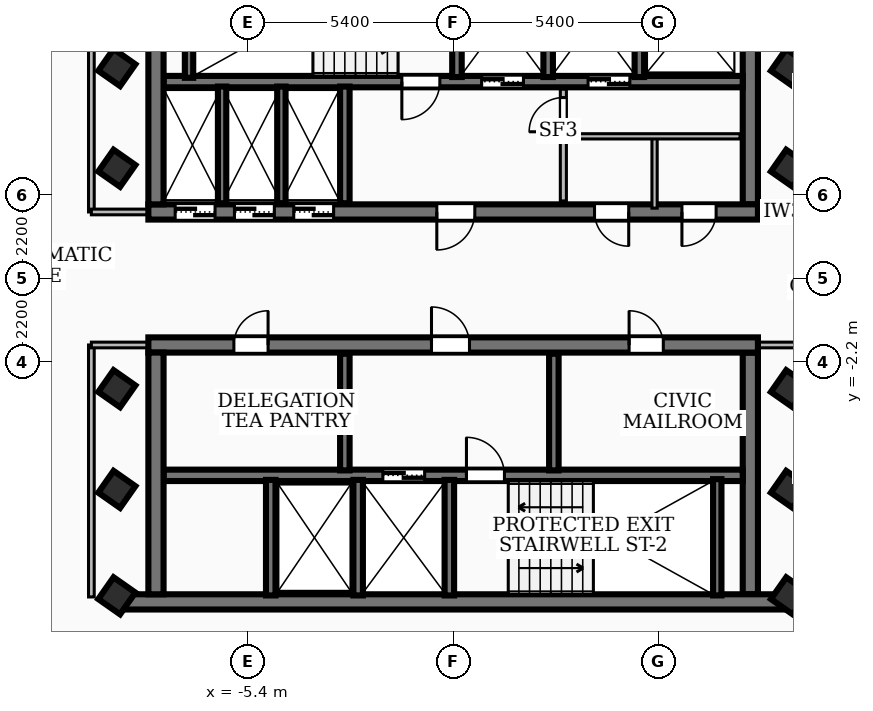
"""IFC4 building model, lengths in metres.
Left out: names, types, materials, properties, quantities, classifications, styles, units other than length and angle.
Written with IfcOpenShell. Run it as: python <this file> out.ifc"""

import sys

from ifc_helpers import new_model, si_unit, direction, frame, frame_2d, origin, origin_2d, place, context, subcontext, project, spatial, rectangle, extrude, element, fill, save


model = new_model("IFC4")
c1 = context("Model", 3, precision=1e-05, world=origin(), true_north=direction((0.0, 1.0)))
c2 = subcontext(c1, "Body", "Model", "MODEL_VIEW")
j1 = project(units=[si_unit("LENGTHUNIT", "METRE"), si_unit("PLANEANGLEUNIT", "RADIAN")], contexts=[c1])
p1 = place(None, origin())
s1 = spatial("IfcSite", under=j1, at=p1, CompositionType="ELEMENT")
p2 = place(p1, origin())
s2 = spatial("IfcBuilding", under=s1, at=p2, CompositionType="ELEMENT")
p3 = place(p2, frame((0.0, 0.0, 264.6)))
s3 = spatial("IfcBuildingStorey", under=s2, at=p3, CompositionType="ELEMENT", Elevation=264.6)
p4 = place(p3, frame((8.02, 1.75, 0.0), z_axis=(0.0, 0.0, 1.0), x_axis=(-1.0, 0.0, 0.0)))
e1 = element("IfcWall", 1, at=p4, inside=s3, PredefinedType="SHEAR", context=c2, shape_type="SweptSolid", body=[
    extrude(rectangle(XDim=16.04, YDim=0.4, at=frame_2d((8.02, 0.0))), origin(), (0.0, 0.0, 1.0), 3.16),
])
p5 = place(p4, frame((7.45, 0.0, 0.0)))
e2 = element("IfcOpeningElement", 2, at=p5, cuts=e1, PredefinedType="OPENING", context=c2, shape_type="SweptSolid", body=[
    extrude(rectangle(XDim=1.0, YDim=2.1, at=frame_2d((0.5, 1.05))), frame((0.0, 0.21, 0.0), z_axis=(0.0, -1.0, 0.0), x_axis=(1.0, 0.0, 0.0)), (0.0, 0.0, 1.0), 0.42),
])
p6 = place(p4, frame((14.285, 0.0, 0.0)))
e3 = element("IfcOpeningElement", 3, at=p6, cuts=e1, PredefinedType="OPENING", context=c2, shape_type="SweptSolid", body=[
    extrude(rectangle(XDim=1.05, YDim=2.15, at=frame_2d((0.525, 1.075))), frame((0.0, 0.21, 0.0), z_axis=(0.0, -1.0, 0.0), x_axis=(1.0, 0.0, 0.0)), (0.0, 0.0, 1.0), 0.42),
])
p7 = place(p4, frame((12.725, 0.0, 0.0)))
e4 = element("IfcOpeningElement", 4, at=p7, cuts=e1, PredefinedType="OPENING", context=c2, shape_type="SweptSolid", body=[
    extrude(rectangle(XDim=1.05, YDim=2.15, at=frame_2d((0.525, 1.075))), frame((0.0, 0.21, 0.0), z_axis=(0.0, -1.0, 0.0), x_axis=(1.0, 0.0, 0.0)), (0.0, 0.0, 1.0), 0.42),
])
p8 = place(p4, frame((11.165, 0.0, 0.0)))
e5 = element("IfcOpeningElement", 5, at=p8, cuts=e1, PredefinedType="OPENING", context=c2, shape_type="SweptSolid", body=[
    extrude(rectangle(XDim=1.05, YDim=2.15, at=frame_2d((0.525, 1.075))), frame((0.0, 0.21, 0.0), z_axis=(0.0, -1.0, 0.0), x_axis=(1.0, 0.0, 0.0)), (0.0, 0.0, 1.0), 0.42),
])
p9 = place(p4, frame((3.4, 0.0, 0.0)))
e6 = element("IfcOpeningElement", 6, at=p9, cuts=e1, PredefinedType="OPENING", context=c2, shape_type="SweptSolid", body=[
    extrude(rectangle(XDim=0.9, YDim=2.06, at=frame_2d((0.45, 1.03))), frame((0.0, 0.21, 0.0), z_axis=(0.0, -1.0, 0.0), x_axis=(1.0, 0.0, 0.0)), (0.0, 0.0, 1.0), 0.42),
])
p10 = place(p4, frame((1.1, 0.0, 0.0)))
e7 = element("IfcOpeningElement", 7, at=p10, cuts=e1, PredefinedType="OPENING", context=c2, shape_type="SweptSolid", body=[
    extrude(rectangle(XDim=0.9, YDim=2.06, at=frame_2d((0.45, 1.03))), frame((0.0, 0.21, 0.0), z_axis=(0.0, -1.0, 0.0), x_axis=(1.0, 0.0, 0.0)), (0.0, 0.0, 1.0), 0.42),
])
for number, where, z_axis, x_axis in (
    (8, (-7.82, 1.95, 0.0), (0.0, 0.0, 1.0), (0.0, 1.0, 0.0)),
    (9, (7.82, 8.31, 0.0), (0.0, 0.0, 1.0), (0.0, -1.0, 0.0)),
):
    element("IfcWall", number, at=place(p3, frame(where, z_axis=z_axis, x_axis=x_axis)), inside=s3, PredefinedType="SHEAR", context=c2, shape_type="SweptSolid", body=[
        extrude(rectangle(XDim=6.36, YDim=0.4, at=frame_2d((3.18, 0.0))), origin(), (0.0, 0.0, 1.0), 3.16),
    ])
p11 = place(p3, frame((7.62, 5.18, 0.0), z_axis=(0.0, 0.0, 1.0), x_axis=(-1.0, 0.0, 0.0)))
e10 = element("IfcWall", 10, at=p11, inside=s3, PredefinedType="SOLIDWALL", context=c2, shape_type="SweptSolid", body=[
    extrude(rectangle(XDim=15.24, YDim=0.3, at=frame_2d((7.62, 0.0))), origin(), (0.0, 0.0, 1.0), 3.16),
])
p12 = place(p11, frame((5.77, 0.0, 0.0)))
e11 = element("IfcOpeningElement", 11, at=p12, cuts=e10, PredefinedType="OPENING", context=c2, shape_type="SweptSolid", body=[
    extrude(rectangle(XDim=1.1, YDim=2.15, at=frame_2d((0.55, 1.075))), frame((0.0, 0.16, 0.0), z_axis=(0.0, -1.0, 0.0), x_axis=(1.0, 0.0, 0.0)), (0.0, 0.0, 1.0), 0.32),
])
p13 = place(p11, frame((2.97, 0.0, 0.0)))
e12 = element("IfcOpeningElement", 12, at=p13, cuts=e10, PredefinedType="OPENING", context=c2, shape_type="SweptSolid", body=[
    extrude(rectangle(XDim=1.1, YDim=2.15, at=frame_2d((0.55, 1.075))), frame((0.0, 0.16, 0.0), z_axis=(0.0, -1.0, 0.0), x_axis=(1.0, 0.0, 0.0)), (0.0, 0.0, 1.0), 0.32),
])
p14 = place(p11, frame((7.97, 0.0, 0.0)))
e13 = element("IfcOpeningElement", 13, at=p14, cuts=e10, PredefinedType="OPENING", context=c2, shape_type="SweptSolid", body=[
    extrude(rectangle(XDim=1.0, YDim=2.1, at=frame_2d((0.5, 1.05))), frame((0.0, 0.16, 0.0), z_axis=(0.0, -1.0, 0.0), x_axis=(1.0, 0.0, 0.0)), (0.0, 0.0, 1.0), 0.32),
])
p15 = place(p3, frame((8.78, -8.51, 0.0), z_axis=(0.0, 0.0, 1.0), x_axis=(-1.0, 0.0, 0.0)))
e14 = element("IfcWall", 14, at=p15, inside=s3, PredefinedType="SHEAR", context=c2, shape_type="SweptSolid", body=[
    extrude(rectangle(XDim=17.56, YDim=0.4, at=frame_2d((8.78, 0.0))), origin(), (0.0, 0.0, 1.0), 3.16),
])
p16 = place(p3, frame((-8.02, -1.75, 0.0), z_axis=(0.0, 0.0, 1.0), x_axis=(1.0, 0.0, 0.0)))
e15 = element("IfcWall", 15, at=p16, inside=s3, PredefinedType="SHEAR", context=c2, shape_type="SweptSolid", body=[
    extrude(rectangle(XDim=16.04, YDim=0.4, at=frame_2d((8.02, 0.0))), origin(), (0.0, 0.0, 1.0), 3.16),
])
p17 = place(p16, frame((7.45, 0.0, 0.0)))
e16 = element("IfcOpeningElement", 16, at=p17, cuts=e15, PredefinedType="OPENING", context=c2, shape_type="SweptSolid", body=[
    extrude(rectangle(XDim=1.0, YDim=2.1, at=frame_2d((0.5, 1.05))), frame((0.0, 0.21, 0.0), z_axis=(0.0, -1.0, 0.0), x_axis=(1.0, 0.0, 0.0)), (0.0, 0.0, 1.0), 0.42),
])
p18 = place(p16, frame((12.65, 0.0, 0.0)))
e17 = element("IfcOpeningElement", 17, at=p18, cuts=e15, PredefinedType="OPENING", context=c2, shape_type="SweptSolid", body=[
    extrude(rectangle(XDim=0.9, YDim=2.06, at=frame_2d((0.45, 1.03))), frame((0.0, 0.21, 0.0), z_axis=(0.0, -1.0, 0.0), x_axis=(1.0, 0.0, 0.0)), (0.0, 0.0, 1.0), 0.42),
])
p19 = place(p16, frame((2.25, 0.0, 0.0)))
e18 = element("IfcOpeningElement", 18, at=p19, cuts=e15, PredefinedType="OPENING", context=c2, shape_type="SweptSolid", body=[
    extrude(rectangle(XDim=0.9, YDim=2.06, at=frame_2d((0.45, 1.03))), frame((0.0, 0.21, 0.0), z_axis=(0.0, -1.0, 0.0), x_axis=(1.0, 0.0, 0.0)), (0.0, 0.0, 1.0), 0.42),
])
for number, where, z_axis, x_axis in (
    (19, (-7.82, -8.31, 0.0), (0.0, 0.0, 1.0), (0.0, 1.0, 0.0)),
    (20, (7.82, -1.95, 0.0), (0.0, 0.0, 1.0), (0.0, -1.0, 0.0)),
):
    element("IfcWall", number, at=place(p3, frame(where, z_axis=z_axis, x_axis=x_axis)), inside=s3, PredefinedType="SHEAR", context=c2, shape_type="SweptSolid", body=[
        extrude(rectangle(XDim=6.36, YDim=0.4, at=frame_2d((3.18, 0.0))), origin(), (0.0, 0.0, 1.0), 3.16),
    ])
p20 = place(p3, frame((-7.62, -5.18, 0.0), z_axis=(0.0, 0.0, 1.0), x_axis=(1.0, 0.0, 0.0)))
e21 = element("IfcWall", 21, at=p20, inside=s3, PredefinedType="SOLIDWALL", context=c2, shape_type="SweptSolid", body=[
    extrude(rectangle(XDim=15.24, YDim=0.3, at=frame_2d((7.62, 0.0))), origin(), (0.0, 0.0, 1.0), 3.16),
])
p21 = place(p20, frame((5.77, 0.0, 0.0)))
e22 = element("IfcOpeningElement", 22, at=p21, cuts=e21, PredefinedType="OPENING", context=c2, shape_type="SweptSolid", body=[
    extrude(rectangle(XDim=1.1, YDim=2.15, at=frame_2d((0.55, 1.075))), frame((0.0, 0.16, 0.0), z_axis=(0.0, -1.0, 0.0), x_axis=(1.0, 0.0, 0.0)), (0.0, 0.0, 1.0), 0.32),
])
p22 = place(p20, frame((7.97, 0.0, 0.0)))
e23 = element("IfcOpeningElement", 23, at=p22, cuts=e21, PredefinedType="OPENING", context=c2, shape_type="SweptSolid", body=[
    extrude(rectangle(XDim=1.0, YDim=2.1, at=frame_2d((0.5, 1.05))), frame((0.0, 0.16, 0.0), z_axis=(0.0, -1.0, 0.0), x_axis=(1.0, 0.0, 0.0)), (0.0, 0.0, 1.0), 0.32),
])
for number, where, z_axis, x_axis in (
    (24, (-6.95, 5.28, 0.0), (0.0, 0.0, 1.0), (0.0, 1.0, 0.0)),
    (25, (6.95, -8.34, 0.0), (0.0, 0.0, 1.0), (0.0, 1.0, 0.0)),
):
    element("IfcWall", number, at=place(p3, frame(where, z_axis=z_axis, x_axis=x_axis)), inside=s3, PredefinedType="SOLIDWALL", context=c2, shape_type="SweptSolid", body=[
        extrude(rectangle(XDim=3.06, YDim=0.22, at=frame_2d((1.53, 0.0))), origin(), (0.0, 0.0, 1.0), 3.16),
    ])
for number, where, z_axis, x_axis in (
    (26, (0.1, 5.3, 0.0), (0.0, 0.0, 1.0), (0.0, 1.0, 0.0)),
    (27, (2.5, 5.3, 0.0), (0.0, 0.0, 1.0), (0.0, 1.0, 0.0)),
    (28, (4.9, 5.3, 0.0), (0.0, 0.0, 1.0), (0.0, 1.0, 0.0)),
):
    element("IfcWall", number, at=place(p3, frame(where, z_axis=z_axis, x_axis=x_axis)), inside=s3, PredefinedType="SOLIDWALL", context=c2, shape_type="SweptSolid", body=[
        extrude(rectangle(XDim=3.04, YDim=0.25, at=frame_2d((1.52, 0.0))), origin(), (0.0, 0.0, 1.0), 3.16),
    ])
p23 = place(p3, frame((-2.85, 1.98, 0.0), z_axis=(0.0, 0.0, 1.0), x_axis=(0.0, 1.0, 0.0)))
e29 = element("IfcWall", 29, at=p23, inside=s3, PredefinedType="SOLIDWALL", context=c2, shape_type="SweptSolid", body=[
    extrude(rectangle(XDim=3.07, YDim=0.25, at=frame_2d((1.535, 0.0))), origin(), (0.0, 0.0, 1.0), 3.16),
])
for number, where, z_axis, x_axis in (
    (30, (-0.1, -8.34, 0.0), (0.0, 0.0, 1.0), (0.0, 1.0, 0.0)),
    (31, (-2.5, -8.34, 0.0), (0.0, 0.0, 1.0), (0.0, 1.0, 0.0)),
    (32, (-4.8, -8.34, 0.0), (0.0, 0.0, 1.0), (0.0, 1.0, 0.0)),
):
    element("IfcWall", number, at=place(p3, frame(where, z_axis=z_axis, x_axis=x_axis)), inside=s3, PredefinedType="SOLIDWALL", context=c2, shape_type="SweptSolid", body=[
        extrude(rectangle(XDim=3.04, YDim=0.25, at=frame_2d((1.52, 0.0))), origin(), (0.0, 0.0, 1.0), 3.16),
    ])
for number, where, z_axis, x_axis in (
    (33, (-2.85, -5.05, 0.0), (0.0, 0.0, 1.0), (0.0, 1.0, 0.0)),
    (34, (2.65, -5.05, 0.0), (0.0, 0.0, 1.0), (0.0, 1.0, 0.0)),
):
    element("IfcWall", number, at=place(p3, frame(where, z_axis=z_axis, x_axis=x_axis)), inside=s3, PredefinedType="SOLIDWALL", context=c2, shape_type="SweptSolid", body=[
        extrude(rectangle(XDim=3.07, YDim=0.25, at=frame_2d((1.535, 0.0))), origin(), (0.0, 0.0, 1.0), 3.16),
    ])
for number, where, z_axis, x_axis in (
    (35, (-6.08, 1.98, 0.0), (0.0, 0.0, 1.0), (0.0, 1.0, 0.0)),
    (36, (-4.52, 1.98, 0.0), (0.0, 0.0, 1.0), (0.0, 1.0, 0.0)),
):
    element("IfcWall", number, at=place(p3, frame(where, z_axis=z_axis, x_axis=x_axis)), inside=s3, PredefinedType="SOLIDWALL", context=c2, shape_type="SweptSolid", body=[
        extrude(rectangle(XDim=3.07, YDim=0.22, at=frame_2d((1.535, 0.0))), origin(), (0.0, 0.0, 1.0), 3.16),
    ])
for number, where, z_axis, x_axis in (
    (37, (-8.85, -5.55, 0.0), (0.0, 0.0, 1.0), (0.574, 0.819, 0.0)),
    (38, (-8.85, -2.9, 0.0), (0.0, 0.0, 1.0), (0.574, 0.819, 0.0)),
    (39, (-8.85, 2.9, 0.0), (0.0, 0.0, 1.0), (0.574, 0.819, 0.0)),
    (40, (-8.85, 5.55, 0.0), (0.0, 0.0, 1.0), (0.574, 0.819, 0.0)),
    (41, (8.85, -5.55, 0.0), (0.0, 0.0, 1.0), (0.574, 0.819, 0.0)),
    (42, (8.85, -2.9, 0.0), (0.0, 0.0, 1.0), (0.574, 0.819, 0.0)),
    (43, (8.85, 2.9, 0.0), (0.0, 0.0, 1.0), (0.574, 0.819, 0.0)),
    (44, (8.85, 5.55, 0.0), (0.0, 0.0, 1.0), (0.574, 0.819, 0.0)),
    (45, (8.85, -8.35, 0.0), (0.0, 0.0, 1.0), (0.574, 0.819, 0.0)),
    (46, (-8.85, -8.35, 0.0), (0.0, 0.0, 1.0), (0.574, 0.819, 0.0)),
):
    element("IfcColumn", number, at=place(p3, frame(where, z_axis=z_axis, x_axis=x_axis)), inside=s3, PredefinedType="COLUMN", context=c2, shape_type="SweptSolid", body=[
        extrude(rectangle(XDim=0.7, YDim=0.7, at=origin_2d()), origin(), (0.0, 0.0, 1.0), 3.42),
    ])
p24 = place(p3, frame((2.9, 2.04, 0.0), z_axis=(0.0, 0.0, 1.0), x_axis=(0.0, 1.0, 0.0)))
e47 = element("IfcWall", 47, at=p24, inside=s3, PredefinedType="PARTITIONING", context=c2, shape_type="SweptSolid", body=[
    extrude(rectangle(XDim=2.94, YDim=0.16, at=frame_2d((1.47, 0.0))), origin(), (0.0, 0.0, 1.0), 2.39),
])
p25 = place(p24, frame((1.82, 0.0, 0.0)))
e48 = element("IfcOpeningElement", 48, at=p25, cuts=e47, PredefinedType="OPENING", context=c2, shape_type="SweptSolid", body=[
    extrude(rectangle(XDim=0.9, YDim=2.06, at=frame_2d((0.45, 1.03))), frame((0.0, 0.09, 0.0), z_axis=(0.0, -1.0, 0.0), x_axis=(1.0, 0.0, 0.0)), (0.0, 0.0, 1.0), 0.18),
])
p26 = place(p3, frame((2.9, 3.74, 0.0), z_axis=(0.0, 0.0, 1.0), x_axis=(1.0, 0.0, 0.0)))
e49 = element("IfcWall", 49, at=p26, inside=s3, PredefinedType="PARTITIONING", context=c2, shape_type="SweptSolid", body=[
    extrude(rectangle(XDim=4.65, YDim=0.138, at=frame_2d((2.325, 0.0))), origin(), (0.0, 0.0, 1.0), 3.16),
])
p27 = place(p3, frame((5.3, 1.85, 0.0), z_axis=(0.0, 0.0, 1.0), x_axis=(0.0, 1.0, 0.0)))
e50 = element("IfcWall", 50, at=p27, inside=s3, PredefinedType="PARTITIONING", context=c2, shape_type="SweptSolid", body=[
    extrude(rectangle(XDim=1.89, YDim=0.138, at=frame_2d((0.945, 0.0))), origin(), (0.0, 0.0, 1.0), 2.39),
])
p28 = place(p3, frame((-9.52, 1.75, 0.0), z_axis=(0.0, 0.0, 1.0), x_axis=(0.0, 1.0, 0.0)))
e51 = element("IfcWall", 51, at=p28, inside=s3, PredefinedType="PARTITIONING", context=c2, shape_type="SweptSolid", body=[
    extrude(rectangle(XDim=6.63, YDim=0.15, at=frame_2d((3.315, 0.0))), origin(), (0.0, 0.0, 1.0), 2.53),
])
p29 = place(p3, frame((-7.85, 1.75, 0.0), z_axis=(0.0, 0.0, 1.0), x_axis=(-1.0, 0.0, 0.0)))
e52 = element("IfcWall", 52, at=p29, inside=s3, PredefinedType="PARTITIONING", context=c2, shape_type="SweptSolid", body=[
    extrude(rectangle(XDim=1.67, YDim=0.15, at=frame_2d((0.835, 0.0))), origin(), (0.0, 0.0, 1.0), 2.39),
])
p30 = place(p3, frame((-9.52, -8.38, 0.0), z_axis=(0.0, 0.0, 1.0), x_axis=(0.0, 1.0, 0.0)))
e53 = element("IfcWall", 53, at=p30, inside=s3, PredefinedType="PARTITIONING", context=c2, shape_type="SweptSolid", body=[
    extrude(rectangle(XDim=6.63, YDim=0.15, at=frame_2d((3.315, 0.0))), origin(), (0.0, 0.0, 1.0), 3.16),
])
for number, where, z_axis, x_axis in (
    (54, (-7.85, -1.75, 0.0), (0.0, 0.0, 1.0), (-1.0, 0.0, 0.0)),
    (55, (7.85, 1.75, 0.0), (0.0, 0.0, 1.0), (1.0, 0.0, 0.0)),
    (56, (7.85, -1.75, 0.0), (0.0, 0.0, 1.0), (1.0, 0.0, 0.0)),
):
    element("IfcWall", number, at=place(p3, frame(where, z_axis=z_axis, x_axis=x_axis)), inside=s3, PredefinedType="PARTITIONING", context=c2, shape_type="SweptSolid", body=[
        extrude(rectangle(XDim=1.67, YDim=0.15, at=frame_2d((0.835, 0.0))), origin(), (0.0, 0.0, 1.0), 2.39),
    ])
p31 = place(p3, frame((-17.625, -0.245, 0.0), z_axis=(0.0, 0.0, 1.0), x_axis=(0.574126736534, 0.818766444352, 0.0)))
e57 = element("IfcWall", 57, at=p31, inside=s3, PredefinedType="PARTITIONING", context=c2, shape_type="SweptSolid", body=[
    extrude(rectangle(XDim=20.34, YDim=0.145, at=frame_2d((10.17, 0.0))), origin(), (0.0, 0.0, 1.0), 2.53),
])
p32 = place(p31, frame((11.16, 0.0, 0.0)))
e58 = element("IfcOpeningElement", 58, at=p32, cuts=e57, PredefinedType="OPENING", context=c2, shape_type="SweptSolid", body=[
    extrude(rectangle(XDim=0.86, YDim=2.04, at=frame_2d((0.43, 1.02))), frame((0.0, 0.083, 0.0), z_axis=(0.0, -1.0, 0.0), x_axis=(1.0, 0.0, 0.0)), (0.0, 0.0, 1.0), 0.165),
])
p33 = place(p31, frame((9.72, 0.0, 0.0)))
e59 = element("IfcOpeningElement", 59, at=p33, cuts=e57, PredefinedType="OPENING", context=c2, shape_type="SweptSolid", body=[
    extrude(rectangle(XDim=0.86, YDim=2.04, at=frame_2d((0.43, 1.02))), frame((0.0, 0.083, 0.0), z_axis=(0.0, -1.0, 0.0), x_axis=(1.0, 0.0, 0.0)), (0.0, 0.0, 1.0), 0.165),
])
p34 = place(p3, frame((17.625, 0.245, 0.0), z_axis=(0.0, 0.0, 1.0), x_axis=(-0.574126736534, -0.818766444352, 0.0)))
e60 = element("IfcWall", 60, at=p34, inside=s3, PredefinedType="PARTITIONING", context=c2, shape_type="SweptSolid", body=[
    extrude(rectangle(XDim=20.34, YDim=0.145, at=frame_2d((10.17, 0.0))), origin(), (0.0, 0.0, 1.0), 2.53),
])
p35 = place(p34, frame((11.16, 0.0, 0.0)))
e61 = element("IfcOpeningElement", 61, at=p35, cuts=e60, PredefinedType="OPENING", context=c2, shape_type="SweptSolid", body=[
    extrude(rectangle(XDim=0.86, YDim=2.04, at=frame_2d((0.43, 1.02))), frame((0.0, 0.083, 0.0), z_axis=(0.0, -1.0, 0.0), x_axis=(1.0, 0.0, 0.0)), (0.0, 0.0, 1.0), 0.165),
])
p36 = place(p34, frame((9.72, 0.0, 0.0)))
e62 = element("IfcOpeningElement", 62, at=p36, cuts=e60, PredefinedType="OPENING", context=c2, shape_type="SweptSolid", body=[
    extrude(rectangle(XDim=0.86, YDim=2.04, at=frame_2d((0.43, 1.02))), frame((0.0, 0.083, 0.0), z_axis=(0.0, -1.0, 0.0), x_axis=(1.0, 0.0, 0.0)), (0.0, 0.0, 1.0), 0.165),
])
p37 = place(p5, origin())
e63 = element("IfcDoor", 63, at=p37, inside=s3, OperationType="SINGLE_SWING_RIGHT", PredefinedType="DOOR", context=c2, shape_type="SweptSolid", body=[
    extrude(rectangle(XDim=1.0, YDim=2.1, at=frame_2d((0.5, 1.05))), frame((0.0, 0.025, 0.0), z_axis=(0.0, -1.0, 0.0), x_axis=(1.0, 0.0, 0.0)), (0.0, 0.0, 1.0), 0.05),
])
fill(e2, e63)
p38 = place(p17, origin())
e64 = element("IfcDoor", 64, at=p38, inside=s3, OperationType="SINGLE_SWING_LEFT", PredefinedType="DOOR", context=c2, shape_type="SweptSolid", body=[
    extrude(rectangle(XDim=1.0, YDim=2.1, at=frame_2d((0.5, 1.05))), frame((0.0, 0.025, 0.0), z_axis=(0.0, -1.0, 0.0), x_axis=(1.0, 0.0, 0.0)), (0.0, 0.0, 1.0), 0.05),
])
fill(e16, e64)
p39 = place(p12, origin())
e65 = element("IfcDoor", 65, at=p39, inside=s3, OperationType="DOUBLE_DOOR_SLIDING", PredefinedType="DOOR", context=c2, shape_type="SweptSolid", body=[
    extrude(rectangle(XDim=1.1, YDim=2.15, at=frame_2d((0.55, 1.075))), frame((0.0, 0.025, 0.0), z_axis=(0.0, -1.0, 0.0), x_axis=(1.0, 0.0, 0.0)), (0.0, 0.0, 1.0), 0.05),
])
fill(e11, e65)
p40 = place(p13, origin())
e66 = element("IfcDoor", 66, at=p40, inside=s3, OperationType="DOUBLE_DOOR_SLIDING", PredefinedType="DOOR", context=c2, shape_type="SweptSolid", body=[
    extrude(rectangle(XDim=1.1, YDim=2.15, at=frame_2d((0.55, 1.075))), frame((0.0, 0.025, 0.0), z_axis=(0.0, -1.0, 0.0), x_axis=(1.0, 0.0, 0.0)), (0.0, 0.0, 1.0), 0.05),
])
fill(e12, e66)
p41 = place(p14, origin())
e67 = element("IfcDoor", 67, at=p41, inside=s3, OperationType="SINGLE_SWING_RIGHT", PredefinedType="DOOR", context=c2, shape_type="SweptSolid", body=[
    extrude(rectangle(XDim=1.0, YDim=2.1, at=frame_2d((0.5, 1.05))), frame((0.0, 0.025, 0.0), z_axis=(0.0, -1.0, 0.0), x_axis=(1.0, 0.0, 0.0)), (0.0, 0.0, 1.0), 0.05),
])
fill(e13, e67)
p42 = place(p21, origin())
e68 = element("IfcDoor", 68, at=p42, inside=s3, OperationType="DOUBLE_DOOR_SLIDING", PredefinedType="DOOR", context=c2, shape_type="SweptSolid", body=[
    extrude(rectangle(XDim=1.1, YDim=2.15, at=frame_2d((0.55, 1.075))), frame((0.0, 0.025, 0.0), z_axis=(0.0, -1.0, 0.0), x_axis=(1.0, 0.0, 0.0)), (0.0, 0.0, 1.0), 0.05),
])
fill(e22, e68)
p43 = place(p22, origin())
e69 = element("IfcDoor", 69, at=p43, inside=s3, OperationType="SINGLE_SWING_LEFT", PredefinedType="DOOR", context=c2, shape_type="SweptSolid", body=[
    extrude(rectangle(XDim=1.0, YDim=2.1, at=frame_2d((0.5, 1.05))), frame((0.0, 0.025, 0.0), z_axis=(0.0, -1.0, 0.0), x_axis=(1.0, 0.0, 0.0)), (0.0, 0.0, 1.0), 0.05),
])
fill(e23, e69)
p44 = place(p6, origin())
e70 = element("IfcDoor", 70, at=p44, inside=s3, OperationType="DOUBLE_DOOR_SLIDING", PredefinedType="DOOR", context=c2, shape_type="SweptSolid", body=[
    extrude(rectangle(XDim=1.05, YDim=2.15, at=frame_2d((0.525, 1.075))), frame((0.0, 0.025, 0.0), z_axis=(0.0, -1.0, 0.0), x_axis=(1.0, 0.0, 0.0)), (0.0, 0.0, 1.0), 0.05),
])
fill(e3, e70)
p45 = place(p7, origin())
e71 = element("IfcDoor", 71, at=p45, inside=s3, OperationType="DOUBLE_DOOR_SLIDING", PredefinedType="DOOR", context=c2, shape_type="SweptSolid", body=[
    extrude(rectangle(XDim=1.05, YDim=2.15, at=frame_2d((0.525, 1.075))), frame((0.0, 0.025, 0.0), z_axis=(0.0, -1.0, 0.0), x_axis=(1.0, 0.0, 0.0)), (0.0, 0.0, 1.0), 0.05),
])
fill(e4, e71)
p46 = place(p8, origin())
e72 = element("IfcDoor", 72, at=p46, inside=s3, OperationType="DOUBLE_DOOR_SLIDING", PredefinedType="DOOR", context=c2, shape_type="SweptSolid", body=[
    extrude(rectangle(XDim=1.05, YDim=2.15, at=frame_2d((0.525, 1.075))), frame((0.0, 0.025, 0.0), z_axis=(0.0, -1.0, 0.0), x_axis=(1.0, 0.0, 0.0)), (0.0, 0.0, 1.0), 0.05),
])
fill(e5, e72)
p47 = place(p18, origin())
e73 = element("IfcDoor", 73, at=p47, inside=s3, OperationType="SINGLE_SWING_LEFT", PredefinedType="DOOR", context=c2, shape_type="SweptSolid", body=[
    extrude(rectangle(XDim=0.9, YDim=2.06, at=frame_2d((0.45, 1.03))), frame((0.0, 0.025, 0.0), z_axis=(0.0, -1.0, 0.0), x_axis=(1.0, 0.0, 0.0)), (0.0, 0.0, 1.0), 0.05),
])
fill(e17, e73)
p48 = place(p19, origin())
e74 = element("IfcDoor", 74, at=p48, inside=s3, OperationType="SINGLE_SWING_RIGHT", PredefinedType="DOOR", context=c2, shape_type="SweptSolid", body=[
    extrude(rectangle(XDim=0.9, YDim=2.06, at=frame_2d((0.45, 1.03))), frame((0.0, 0.025, 0.0), z_axis=(0.0, -1.0, 0.0), x_axis=(1.0, 0.0, 0.0)), (0.0, 0.0, 1.0), 0.05),
])
fill(e18, e74)
p49 = place(p9, origin())
e75 = element("IfcDoor", 75, at=p49, inside=s3, OperationType="SINGLE_SWING_LEFT", PredefinedType="DOOR", context=c2, shape_type="SweptSolid", body=[
    extrude(rectangle(XDim=0.9, YDim=2.06, at=frame_2d((0.45, 1.03))), frame((0.0, 0.025, 0.0), z_axis=(0.0, -1.0, 0.0), x_axis=(1.0, 0.0, 0.0)), (0.0, 0.0, 1.0), 0.05),
])
fill(e6, e75)
p50 = place(p10, origin())
e76 = element("IfcDoor", 76, at=p50, inside=s3, OperationType="SINGLE_SWING_RIGHT", PredefinedType="DOOR", context=c2, shape_type="SweptSolid", body=[
    extrude(rectangle(XDim=0.9, YDim=2.06, at=frame_2d((0.45, 1.03))), frame((0.0, 0.025, 0.0), z_axis=(0.0, -1.0, 0.0), x_axis=(1.0, 0.0, 0.0)), (0.0, 0.0, 1.0), 0.05),
])
fill(e7, e76)
p51 = place(p25, origin())
e77 = element("IfcDoor", 77, at=p51, inside=s3, OperationType="SINGLE_SWING_LEFT", PredefinedType="DOOR", context=c2, shape_type="SweptSolid", body=[
    extrude(rectangle(XDim=0.9, YDim=2.06, at=frame_2d((0.45, 1.03))), frame((0.0, 0.025, 0.0), z_axis=(0.0, -1.0, 0.0), x_axis=(1.0, 0.0, 0.0)), (0.0, 0.0, 1.0), 0.05),
])
fill(e48, e77)
save(model, sys.argv[1])
